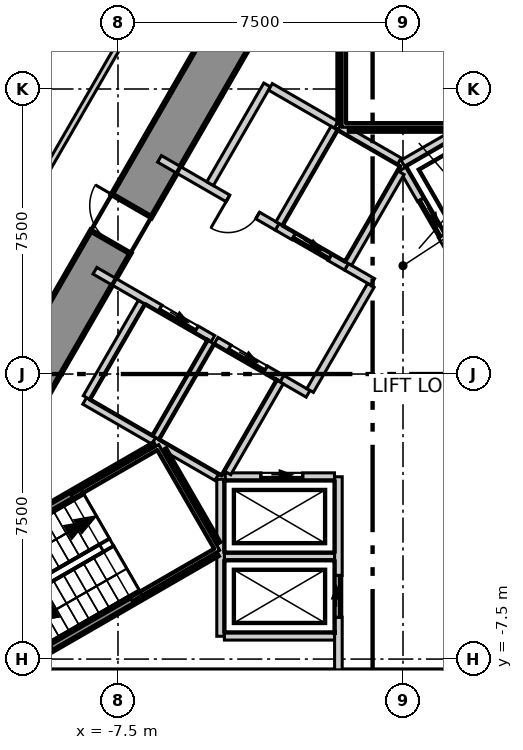
"""IFC4 building model, lengths in metres.
Left out: names, types, materials, properties, quantities, classifications, styles, units other than length and angle.
Written with IfcOpenShell. Run it as: python <this file> out.ifc"""

import sys

from ifc_helpers import new_model, si_unit, direction, frame, frame_2d, origin, place, context, subcontext, project, spatial, polyline, rectangle, outline, extrude, element, fill, save


model = new_model("IFC4")
c1 = context("Model", 3, precision=1e-05, world=origin(), true_north=direction((0.0, 1.0)))
c2 = subcontext(c1, "Body", "Model", "MODEL_VIEW")
j1 = project(units=[si_unit("LENGTHUNIT", "METRE"), si_unit("PLANEANGLEUNIT", "RADIAN")], contexts=[c1])
p1 = place(None, origin())
s1 = spatial("IfcSite", under=j1, at=p1, CompositionType="ELEMENT")
p2 = place(p1, origin())
s2 = spatial("IfcBuilding", under=s1, at=p2, CompositionType="ELEMENT")
p3 = place(p2, frame((0.0, 0.0, 185.3)))
s3 = spatial("IfcBuildingStorey", under=s2, at=p3, CompositionType="ELEMENT", Elevation=185.3)
p4 = place(p3, frame((-1.703, 13.85, -0.6), z_axis=(0.0, 0.0, 1.0), x_axis=(-0.500005991004, -0.866021944849, 0.0)))
e1 = element("IfcWall", 1, at=p4, inside=s3, PredefinedType="SHEAR", context=c2, shape_type="SweptSolid", body=[
    extrude(outline(polyline([(-0.635, -0.6), (1.328, -0.6), (3.291, -0.6), (5.254, -0.6), (7.217, -0.6), (9.18, -0.6), (11.143, -0.6), (13.106, -0.6), (15.069, -0.6), (17.032, -0.6), (18.995, -0.6), (20.958, -0.6), (22.921, -0.6), (21.651, 0.6), (19.74, 0.6), (17.83, 0.6), (15.919, 0.6), (14.009, 0.6), (12.098, 0.6), (10.188, 0.6), (8.277, 0.6), (6.367, 0.6), (4.456, 0.6), (2.546, 0.6), (0.635, 0.6), (-0.635, -0.6)])), origin(), (0.0, 0.0, 1.0), 6.3),
])
p5 = place(p4, frame((10.881, 0.0, 0.6)))
e2 = element("IfcOpeningElement", 2, at=p5, cuts=e1, PredefinedType="OPENING", context=c2, shape_type="SweptSolid", body=[
    extrude(rectangle(XDim=1.1, YDim=2.1, at=frame_2d((0.55, 1.05))), frame((0.0, 0.61, 0.0), z_axis=(0.0, -1.0, 0.0), x_axis=(1.0, 0.0, 0.0)), (0.0, 0.0, 1.0), 1.22),
])
p6 = place(p4, frame((4.407, 0.0, 0.6)))
e3 = element("IfcOpeningElement", 3, at=p6, cuts=e1, PredefinedType="OPENING", context=c2, shape_type="SweptSolid", body=[
    extrude(rectangle(XDim=1.0, YDim=2.1, at=frame_2d((0.5, 1.05))), frame((0.0, 0.61, 0.0), z_axis=(0.0, -1.0, 0.0), x_axis=(1.0, 0.0, 0.0)), (0.0, 0.0, 1.0), 1.22),
])
p7 = place(p3, frame((-11.143, -8.4, -0.6), z_axis=(0.0, 0.0, 1.0), x_axis=(1.0, 0.0, 0.0)))
e4 = element("IfcWall", 4, at=p7, inside=s3, PredefinedType="SHEAR", context=c2, shape_type="SweptSolid", body=[
    extrude(outline(polyline([(-0.635, -0.6), (1.328, -0.6), (3.291, -0.6), (5.254, -0.6), (7.217, -0.6), (9.18, -0.6), (11.143, -0.6), (13.106, -0.6), (15.069, -0.6), (17.032, -0.6), (18.995, -0.6), (20.958, -0.6), (22.921, -0.6), (21.651, 0.6), (19.74, 0.6), (17.83, 0.6), (15.919, 0.6), (14.009, 0.6), (12.098, 0.6), (10.188, 0.6), (8.277, 0.6), (6.367, 0.6), (4.456, 0.6), (2.546, 0.6), (0.635, 0.6), (-0.635, -0.6)])), origin(), (0.0, 0.0, 1.0), 6.3),
])
p8 = place(p7, frame((17.002, 0.0, 0.6)))
e5 = element("IfcOpeningElement", 5, at=p8, cuts=e4, PredefinedType="OPENING", context=c2, shape_type="SweptSolid", body=[
    extrude(rectangle(XDim=0.9, YDim=2.1, at=frame_2d((0.45, 1.05))), frame((0.0, 0.61, 0.0), z_axis=(0.0, -1.0, 0.0), x_axis=(1.0, 0.0, 0.0)), (0.0, 0.0, 1.0), 1.22),
])
p9 = place(p3, frame((-9.353, 5.4, 0.0), z_axis=(0.0, 0.0, 1.0), x_axis=(0.500017037849, 0.866015566754, 0.0)))
e6 = element("IfcWall", 6, at=p9, inside=s3, PredefinedType="PARTITIONING", context=c2, shape_type="SweptSolid", body=[
    extrude(rectangle(XDim=12.817, YDim=0.15, at=frame_2d((6.409, 0.0))), origin(), (0.0, 0.0, 1.0), 5.7),
])
p10 = place(p9, frame((5.909, 0.0, 0.0)))
e7 = element("IfcOpeningElement", 7, at=p10, cuts=e6, PredefinedType="OPENING", context=c2, shape_type="SweptSolid", body=[
    extrude(rectangle(XDim=1.0, YDim=2.1, at=frame_2d((0.5, 1.05))), frame((0.0, 0.085, 0.0), z_axis=(0.0, -1.0, 0.0), x_axis=(1.0, 0.0, 0.0)), (0.0, 0.0, 1.0), 0.17),
])
p11 = place(p3, frame((-12.567, 5.033, 0.0), z_axis=(0.0, 0.0, 1.0), x_axis=(0.499999287049, 0.866025815407, 0.0)))
e8 = element("IfcWall", 8, at=p11, inside=s3, PredefinedType="PARTITIONING", context=c2, shape_type="SweptSolid", body=[
    extrude(rectangle(XDim=20.434, YDim=0.15, at=frame_2d((10.217, 0.0))), origin(), (0.0, 0.0, 1.0), 5.7),
])
p12 = place(p3, frame((-26.19, -11.679, 0.0), z_axis=(0.0, 0.0, 1.0), x_axis=(0.500012382508, 0.866018254622, 0.0)))
e9 = element("IfcWall", 9, at=p12, inside=s3, PredefinedType="PARTITIONING", context=c2, shape_type="SweptSolid", body=[
    extrude(rectangle(XDim=46.505, YDim=0.15, at=frame_2d((23.252, 0.0))), origin(), (0.0, 0.0, 1.0), 5.7),
])
p13 = place(p3, frame((-8.376, -0.707, 0.0), z_axis=(0.0, 0.0, 1.0), x_axis=(0.866067520717, -0.499927044236, 0.0)))
e10 = element("IfcWall", 10, at=p13, inside=s3, PredefinedType="SOLIDWALL", context=c2, shape_type="SweptSolid", body=[
    extrude(rectangle(XDim=2.1, YDim=0.2, at=frame_2d((1.05, 0.0))), origin(), (0.0, 0.0, 1.0), 5.7),
])
p14 = place(p3, frame((-8.326, -0.62, 0.0), z_axis=(0.0, 0.0, 1.0), x_axis=(0.500023687443, 0.866011727401, 0.0)))
e11 = element("IfcWall", 11, at=p14, inside=s3, PredefinedType="SOLIDWALL", context=c2, shape_type="SweptSolid", body=[
    extrude(rectangle(XDim=2.9, YDim=0.2, at=frame_2d((1.45, 0.0))), origin(), (0.0, 0.0, 1.0), 5.7),
])
p15 = place(p3, frame((-4.7, -4.8, 0.0), z_axis=(0.0, 0.0, 1.0), x_axis=(1.0, 0.0, 0.0)))
e12 = element("IfcWall", 12, at=p15, inside=s3, PredefinedType="SOLIDWALL", context=c2, shape_type="SweptSolid", body=[
    extrude(rectangle(XDim=2.9, YDim=0.2, at=frame_2d((1.45, 0.0))), origin(), (0.0, 0.0, 1.0), 5.7),
])
p16 = place(p3, frame((-4.8, -6.9, 0.0), z_axis=(0.0, 0.0, 1.0), x_axis=(0.0, 1.0, 0.0)))
e13 = element("IfcWall", 13, at=p16, inside=s3, PredefinedType="SOLIDWALL", context=c2, shape_type="SweptSolid", body=[
    extrude(rectangle(XDim=4.131, YDim=0.2, at=frame_2d((2.065, 0.0))), origin(), (0.0, 0.0, 1.0), 5.7),
])
p17 = place(p3, frame((-4.7, -6.9, 0.0), z_axis=(0.0, 0.0, 1.0), x_axis=(1.0, 0.0, 0.0)))
e14 = element("IfcWall", 14, at=p17, inside=s3, PredefinedType="SOLIDWALL", context=c2, shape_type="SweptSolid", body=[
    extrude(rectangle(XDim=2.9, YDim=0.2, at=frame_2d((1.45, 0.0))), origin(), (0.0, 0.0, 1.0), 5.7),
])
p18 = place(p3, frame((-1.7, -8.38, 0.0), z_axis=(0.0, 0.0, 1.0), x_axis=(0.0, 1.0, 0.0)))
e15 = element("IfcWall", 15, at=p18, inside=s3, PredefinedType="SOLIDWALL", context=c2, shape_type="SweptSolid", body=[
    extrude(rectangle(XDim=5.677, YDim=0.2, at=frame_2d((2.838, 0.0))), origin(), (0.0, 0.0, 1.0), 5.7),
])
p19 = place(p18, frame((1.98, 0.0, 0.0)))
e16 = element("IfcOpeningElement", 16, at=p19, cuts=e15, PredefinedType="OPENING", context=c2, shape_type="SweptSolid", body=[
    extrude(rectangle(XDim=1.1, YDim=2.1, at=frame_2d((0.55, 1.05))), frame((0.0, 0.11, 0.0), z_axis=(0.0, -1.0, 0.0), x_axis=(1.0, 0.0, 0.0)), (0.0, 0.0, 1.0), 0.22),
])
p20 = place(p3, frame((-4.676, -2.7, 0.0), z_axis=(0.0, 0.0, 1.0), x_axis=(1.0, 0.0, 0.0)))
e17 = element("IfcWall", 17, at=p20, inside=s3, PredefinedType="SOLIDWALL", context=c2, shape_type="SweptSolid", body=[
    extrude(rectangle(XDim=2.873, YDim=0.2, at=frame_2d((1.437, 0.0))), origin(), (0.0, 0.0, 1.0), 5.7),
])
p21 = place(p20, frame((0.937, 0.0, 0.0)))
e18 = element("IfcOpeningElement", 18, at=p21, cuts=e17, PredefinedType="OPENING", context=c2, shape_type="SweptSolid", body=[
    extrude(rectangle(XDim=1.1, YDim=2.1, at=frame_2d((0.55, 1.05))), frame((0.0, 0.11, 0.0), z_axis=(0.0, -1.0, 0.0), x_axis=(1.0, 0.0, 0.0)), (0.0, 0.0, 1.0), 0.22),
])
p22 = place(p3, frame((-0.002, 5.541, 0.0), z_axis=(0.0, 0.0, 1.0), x_axis=(0.86600155993, 0.500041296494, 0.0)))
e19 = element("IfcWall", 19, at=p22, inside=s3, PredefinedType="SOLIDWALL", context=c2, shape_type="SweptSolid", body=[
    extrude(rectangle(XDim=4.132, YDim=0.2, at=frame_2d((2.066, 0.0))), origin(), (0.0, 0.0, 1.0), 5.7),
])
p23 = place(p3, frame((0.0, 5.4, 0.0), z_axis=(0.0, 0.0, 1.0), x_axis=(0.500103862429, -0.865965430478, 0.0)))
e20 = element("IfcWall", 20, at=p23, inside=s3, PredefinedType="SOLIDWALL", context=c2, shape_type="SweptSolid", body=[
    extrude(rectangle(XDim=2.973, YDim=0.2, at=frame_2d((1.487, 0.0))), origin(), (0.0, 0.0, 1.0), 5.7),
])
p24 = place(p23, frame((0.937, 0.0, 0.0)))
e21 = element("IfcOpeningElement", 21, at=p24, cuts=e20, PredefinedType="OPENING", context=c2, shape_type="SweptSolid", body=[
    extrude(rectangle(XDim=1.1, YDim=2.1, at=frame_2d((0.55, 1.05))), frame((0.0, 0.11, 0.0), z_axis=(0.0, -1.0, 0.0), x_axis=(1.0, 0.0, 0.0)), (0.0, 0.0, 1.0), 0.22),
])
p25 = place(p3, frame((-8.107, 2.718, 0.0), z_axis=(0.0, 0.0, 1.0), x_axis=(0.866019870564, -0.500009583697, 0.0)))
e22 = element("IfcWall", 22, at=p25, inside=s3, PredefinedType="SOLIDWALL", context=c2, shape_type="SweptSolid", body=[
    extrude(rectangle(XDim=3.582, YDim=0.2, at=frame_2d((1.791, 0.0))), origin(), (0.0, 0.0, 1.0), 5.7),
])
p26 = place(p25, frame((1.98, 0.0, 0.0)))
e23 = element("IfcOpeningElement", 23, at=p26, cuts=e22, PredefinedType="OPENING", context=c2, shape_type="SweptSolid", body=[
    extrude(rectangle(XDim=1.1, YDim=2.1, at=frame_2d((0.55, 1.05))), frame((0.0, 0.11, 0.0), z_axis=(0.0, -1.0, 0.0), x_axis=(1.0, 0.0, 0.0)), (0.0, 0.0, 1.0), 0.22),
])
p27 = place(p3, frame((-3.188, -0.122, 0.0), z_axis=(0.0, 0.0, 1.0), x_axis=(0.865705793592, -0.50055317294, 0.0)))
e24 = element("IfcWall", 24, at=p27, inside=s3, PredefinedType="SOLIDWALL", context=c2, shape_type="SweptSolid", body=[
    extrude(rectangle(XDim=0.797, YDim=0.2, at=frame_2d((0.398, 0.0))), origin(), (0.0, 0.0, 1.0), 5.7),
])
p28 = place(p3, frame((-6.407, 5.662, 0.0), z_axis=(0.0, 0.0, 1.0), x_axis=(0.866019870564, -0.500009583697, 0.0)))
e25 = element("IfcWall", 25, at=p28, inside=s3, PredefinedType="SOLIDWALL", context=c2, shape_type="SweptSolid", body=[
    extrude(rectangle(XDim=3.582, YDim=0.2, at=frame_2d((1.791, 0.0))), origin(), (0.0, 0.0, 1.0), 5.7),
])
p29 = place(p28, frame((2.08, 0.0, 0.0)))
e26 = element("IfcOpeningElement", 26, at=p29, cuts=e25, PredefinedType="OPENING", context=c2, shape_type="SweptSolid", body=[
    extrude(rectangle(XDim=0.9, YDim=2.1, at=frame_2d((0.45, 1.05))), frame((0.0, 0.11, 0.0), z_axis=(0.0, -1.0, 0.0), x_axis=(1.0, 0.0, 0.0)), (0.0, 0.0, 1.0), 0.22),
])
p30 = place(p3, frame((-1.488, 2.822, 0.0), z_axis=(0.0, 0.0, 1.0), x_axis=(0.866236612152, -0.499633997809, 0.0)))
e27 = element("IfcWall", 27, at=p30, inside=s3, PredefinedType="SOLIDWALL", context=c2, shape_type="SweptSolid", body=[
    extrude(rectangle(XDim=0.796, YDim=0.2, at=frame_2d((0.398, 0.0))), origin(), (0.0, 0.0, 1.0), 5.7),
])
p31 = place(p3, frame((-5.076, 5.009, 0.0), z_axis=(0.0, 0.0, 1.0), x_axis=(0.50002537861, 0.866010750942, 0.0)))
e28 = element("IfcWall", 28, at=p31, inside=s3, PredefinedType="SOLIDWALL", context=c2, shape_type="SweptSolid", body=[
    extrude(rectangle(XDim=3.0, YDim=0.2, at=frame_2d((1.5, 0.0))), origin(), (0.0, 0.0, 1.0), 5.7),
])
p32 = place(p3, frame((-3.489, 7.557, 0.0), z_axis=(0.0, 0.0, 1.0), x_axis=(0.866010750942, -0.50002537861, 0.0)))
e29 = element("IfcWall", 29, at=p32, inside=s3, PredefinedType="SOLIDWALL", context=c2, shape_type="SweptSolid", body=[
    extrude(rectangle(XDim=2.0, YDim=0.2, at=frame_2d((1.0, 0.0))), origin(), (0.0, 0.0, 1.0), 5.7),
])
p33 = place(p3, frame((-2.444, -0.433, 0.0), z_axis=(0.0, 0.0, 1.0), x_axis=(0.500035624827, 0.866004834804, 0.0)))
e30 = element("IfcWall", 30, at=p33, inside=s3, PredefinedType="SOLIDWALL", context=c2, shape_type="SweptSolid", body=[
    extrude(rectangle(XDim=3.194, YDim=0.2, at=frame_2d((1.597, 0.0))), origin(), (0.0, 0.0, 1.0), 5.7),
])
p34 = place(p3, frame((-6.557, -1.757, 0.0), z_axis=(0.0, 0.0, 1.0), x_axis=(0.8659754619, -0.500086491905, 0.0)))
e31 = element("IfcWall", 31, at=p34, inside=s3, PredefinedType="SOLIDWALL", context=c2, shape_type="SweptSolid", body=[
    extrude(rectangle(XDim=1.916, YDim=0.2, at=frame_2d((0.958, 0.0))), origin(), (0.0, 0.0, 1.0), 5.7),
])
p35 = place(p3, frame((-6.507, -1.67, 0.0), z_axis=(0.0, 0.0, 1.0), x_axis=(0.50012328804, 0.865954211699, 0.0)))
e32 = element("IfcWall", 32, at=p35, inside=s3, PredefinedType="SOLIDWALL", context=c2, shape_type="SweptSolid", body=[
    extrude(rectangle(XDim=2.9, YDim=0.2, at=frame_2d((1.45, 0.0))), origin(), (0.0, 0.0, 1.0), 5.7),
])
p36 = place(p3, frame((-4.92, 0.878, 0.0), z_axis=(0.0, 0.0, 1.0), x_axis=(0.866010750942, -0.50002537861, 0.0)))
e33 = element("IfcWall", 33, at=p36, inside=s3, PredefinedType="SOLIDWALL", context=c2, shape_type="SweptSolid", body=[
    extrude(rectangle(XDim=2.0, YDim=0.2, at=frame_2d((1.0, 0.0))), origin(), (0.0, 0.0, 1.0), 5.7),
])
p37 = place(p36, frame((0.4, 0.0, 0.0)))
e34 = element("IfcOpeningElement", 34, at=p37, cuts=e33, PredefinedType="OPENING", context=c2, shape_type="SweptSolid", body=[
    extrude(rectangle(XDim=1.1, YDim=2.1, at=frame_2d((0.55, 1.05))), frame((0.0, 0.11, 0.0), z_axis=(0.0, -1.0, 0.0), x_axis=(1.0, 0.0, 0.0)), (0.0, 0.0, 1.0), 0.22),
])
p38 = place(p3, frame((-4.619, -2.6, 0.0), z_axis=(0.0, 0.0, 1.0), x_axis=(0.50009492287, 0.865970593103, 0.0)))
e35 = element("IfcWall", 35, at=p38, inside=s3, PredefinedType="SOLIDWALL", context=c2, shape_type="SweptSolid", body=[
    extrude(rectangle(XDim=2.761, YDim=0.2, at=frame_2d((1.381, 0.0))), origin(), (0.0, 0.0, 1.0), 5.7),
])
p39 = place(p3, frame((-3.309, 3.873, 0.0), z_axis=(0.0, 0.0, 1.0), x_axis=(0.866098583652, -0.499873227325, 0.0)))
e36 = element("IfcWall", 36, at=p39, inside=s3, PredefinedType="SOLIDWALL", context=c2, shape_type="SweptSolid", body=[
    extrude(rectangle(XDim=2.103, YDim=0.2, at=frame_2d((1.051, 0.0))), origin(), (0.0, 0.0, 1.0), 5.7),
])
p40 = place(p39, frame((0.502, 0.0, 0.0)))
e37 = element("IfcOpeningElement", 37, at=p40, cuts=e36, PredefinedType="OPENING", context=c2, shape_type="SweptSolid", body=[
    extrude(rectangle(XDim=1.1, YDim=2.1, at=frame_2d((0.55, 1.05))), frame((0.0, 0.11, 0.0), z_axis=(0.0, -1.0, 0.0), x_axis=(1.0, 0.0, 0.0)), (0.0, 0.0, 1.0), 0.22),
])
p41 = place(p3, frame((-3.257, 3.959, 0.0), z_axis=(0.0, 0.0, 1.0), x_axis=(0.50012328804, 0.865954211699, 0.0)))
e38 = element("IfcWall", 38, at=p41, inside=s3, PredefinedType="SOLIDWALL", context=c2, shape_type="SweptSolid", body=[
    extrude(rectangle(XDim=2.9, YDim=0.2, at=frame_2d((1.45, 0.0))), origin(), (0.0, 0.0, 1.0), 5.7),
])
p42 = place(p3, frame((-1.67, 6.507, 0.0), z_axis=(0.0, 0.0, 1.0), x_axis=(0.865941441609, -0.500145398563, 0.0)))
e39 = element("IfcWall", 39, at=p42, inside=s3, PredefinedType="SOLIDWALL", context=c2, shape_type="SweptSolid", body=[
    extrude(rectangle(XDim=1.815, YDim=0.2, at=frame_2d((0.908, 0.0))), origin(), (0.0, 0.0, 1.0), 5.7),
])
p43 = place(p3, frame((-1.438, 2.909, 0.0), z_axis=(0.0, 0.0, 1.0), x_axis=(0.499829630636, 0.866123744241, 0.0)))
e40 = element("IfcWall", 40, at=p43, inside=s3, PredefinedType="SOLIDWALL", context=c2, shape_type="SweptSolid", body=[
    extrude(rectangle(XDim=2.761, YDim=0.2, at=frame_2d((1.38, 0.0))), origin(), (0.0, 0.0, 1.0), 5.7),
])
p44 = place(p3, frame((-11.76, -4.942, 0.0), z_axis=(0.0, 0.0, 1.0), x_axis=(0.866048276411, 0.499960381356, 0.0)))
e41 = element("IfcWall", 41, at=p44, inside=s3, PredefinedType="SOLIDWALL", context=c2, shape_type="SweptSolid", body=[
    extrude(rectangle(XDim=6.04, YDim=0.2, at=frame_2d((3.02, 0.0))), origin(), (0.0, 0.0, 1.0), 5.7),
])
p45 = place(p3, frame((-6.329, -2.038, 0.0), z_axis=(0.0, 0.0, 1.0), x_axis=(0.500200581029, -0.865909567298, 0.0)))
e42 = element("IfcWall", 42, at=p45, inside=s3, PredefinedType="SOLIDWALL", context=c2, shape_type="SweptSolid", body=[
    extrude(rectangle(XDim=2.799, YDim=0.2, at=frame_2d((1.399, 0.0))), origin(), (0.0, 0.0, 1.0), 5.7),
])
p46 = place(p3, frame((-10.16, -7.713, 0.0), z_axis=(0.0, 0.0, 1.0), x_axis=(0.866048276411, 0.499960381356, 0.0)))
e43 = element("IfcWall", 43, at=p46, inside=s3, PredefinedType="SOLIDWALL", context=c2, shape_type="SweptSolid", body=[
    extrude(rectangle(XDim=6.04, YDim=0.2, at=frame_2d((3.02, 0.0))), origin(), (0.0, 0.0, 1.0), 5.7),
])
p47 = place(p3, frame((-1.4, 6.5, 0.0), z_axis=(0.0, 0.0, 1.0), x_axis=(1.0, 0.0, 0.0)))
e44 = element("IfcWall", 44, at=p47, inside=s3, PredefinedType="SOLIDWALL", context=c2, shape_type="SweptSolid", body=[
    extrude(rectangle(XDim=2.8, YDim=0.2, at=frame_2d((1.4, 0.0))), origin(), (0.0, 0.0, 1.0), 5.7),
])
p48 = place(p3, frame((-1.6, 6.615, 0.0), z_axis=(0.0, 0.0, 1.0), x_axis=(0.0, 1.0, 0.0)))
e45 = element("IfcWall", 45, at=p48, inside=s3, PredefinedType="SOLIDWALL", context=c2, shape_type="SweptSolid", body=[
    extrude(rectangle(XDim=6.04, YDim=0.2, at=frame_2d((3.02, 0.0))), origin(), (0.0, 0.0, 1.0), 5.7),
])
p49 = place(p21, origin())
e46 = element("IfcDoor", 46, at=p49, inside=s3, OperationType="SLIDING_TO_LEFT", PredefinedType="DOOR", context=c2, shape_type="SweptSolid", body=[
    extrude(rectangle(XDim=1.1, YDim=2.1, at=frame_2d((0.55, 1.05))), frame((0.0, 0.025, 0.0), z_axis=(0.0, -1.0, 0.0), x_axis=(1.0, 0.0, 0.0)), (0.0, 0.0, 1.0), 0.05),
])
fill(e18, e46)
p50 = place(p19, origin())
e47 = element("IfcDoor", 47, at=p50, inside=s3, OperationType="SLIDING_TO_LEFT", PredefinedType="DOOR", context=c2, shape_type="SweptSolid", body=[
    extrude(rectangle(XDim=1.1, YDim=2.1, at=frame_2d((0.55, 1.05))), frame((0.0, 0.025, 0.0), z_axis=(0.0, -1.0, 0.0), x_axis=(1.0, 0.0, 0.0)), (0.0, 0.0, 1.0), 0.05),
])
fill(e16, e47)
p51 = place(p24, origin())
e48 = element("IfcDoor", 48, at=p51, inside=s3, OperationType="SLIDING_TO_LEFT", PredefinedType="DOOR", context=c2, shape_type="SweptSolid", body=[
    extrude(rectangle(XDim=1.1, YDim=2.1, at=frame_2d((0.55, 1.05))), frame((0.0, 0.025, 0.0), z_axis=(0.0, -1.0, 0.0), x_axis=(1.0, 0.0, 0.0)), (0.0, 0.0, 1.0), 0.05),
])
fill(e21, e48)
p52 = place(p37, origin())
e49 = element("IfcDoor", 49, at=p52, inside=s3, OperationType="SLIDING_TO_LEFT", PredefinedType="DOOR", context=c2, shape_type="SweptSolid", body=[
    extrude(rectangle(XDim=1.1, YDim=2.1, at=frame_2d((0.55, 1.05))), frame((0.0, 0.025, 0.0), z_axis=(0.0, -1.0, 0.0), x_axis=(1.0, 0.0, 0.0)), (0.0, 0.0, 1.0), 0.05),
])
fill(e34, e49)
p53 = place(p40, origin())
e50 = element("IfcDoor", 50, at=p53, inside=s3, OperationType="SLIDING_TO_LEFT", PredefinedType="DOOR", context=c2, shape_type="SweptSolid", body=[
    extrude(rectangle(XDim=1.1, YDim=2.1, at=frame_2d((0.55, 1.05))), frame((0.0, 0.025, 0.0), z_axis=(0.0, -1.0, 0.0), x_axis=(1.0, 0.0, 0.0)), (0.0, 0.0, 1.0), 0.05),
])
fill(e37, e50)
p54 = place(p26, origin())
e51 = element("IfcDoor", 51, at=p54, inside=s3, OperationType="SLIDING_TO_LEFT", PredefinedType="DOOR", context=c2, shape_type="SweptSolid", body=[
    extrude(rectangle(XDim=1.1, YDim=2.1, at=frame_2d((0.55, 1.05))), frame((0.0, 0.025, 0.0), z_axis=(0.0, -1.0, 0.0), x_axis=(1.0, 0.0, 0.0)), (0.0, 0.0, 1.0), 0.05),
])
fill(e23, e51)
p55 = place(p29, origin())
e52 = element("IfcDoor", 52, at=p55, inside=s3, OperationType="SINGLE_SWING_LEFT", PredefinedType="DOOR", context=c2, shape_type="SweptSolid", body=[
    extrude(rectangle(XDim=0.9, YDim=2.1, at=frame_2d((0.45, 1.05))), frame((0.0, 0.025, 0.0), z_axis=(0.0, -1.0, 0.0), x_axis=(1.0, 0.0, 0.0)), (0.0, 0.0, 1.0), 0.05),
])
fill(e26, e52)
p56 = place(p5, origin())
e53 = element("IfcDoor", 53, at=p56, inside=s3, OperationType="SINGLE_SWING_LEFT", PredefinedType="DOOR", context=c2, shape_type="SweptSolid", body=[
    extrude(rectangle(XDim=1.1, YDim=2.1, at=frame_2d((0.55, 1.05))), frame((0.0, 0.025, 0.0), z_axis=(0.0, -1.0, 0.0), x_axis=(1.0, 0.0, 0.0)), (0.0, 0.0, 1.0), 0.05),
])
fill(e2, e53)
save(model, sys.argv[1])
